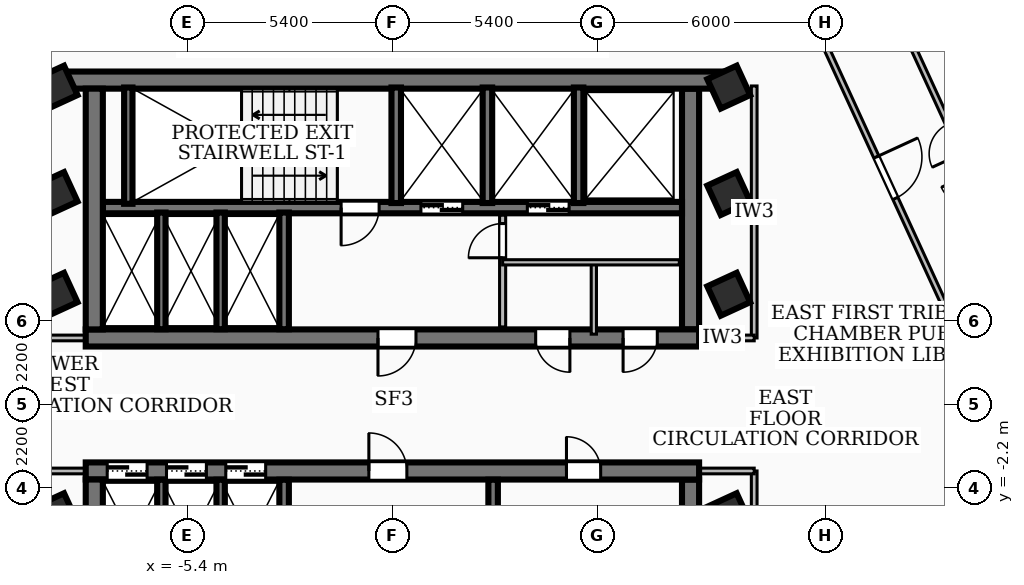
"""IFC4 building model, lengths in metres.
Left out: names, types, materials, properties, quantities, classifications, styles, units other than length and angle.
Written with IfcOpenShell. Run it as: python <this file> out.ifc"""

import sys

from ifc_helpers import new_model, si_unit, direction, frame, frame_2d, origin, origin_2d, place, context, subcontext, project, spatial, rectangle, extrude, element, fill, save


model = new_model("IFC4")
c1 = context("Model", 3, precision=1e-05, world=origin(), true_north=direction((0.0, 1.0)))
c2 = subcontext(c1, "Body", "Model", "MODEL_VIEW")
j1 = project(units=[si_unit("LENGTHUNIT", "METRE"), si_unit("PLANEANGLEUNIT", "RADIAN")], contexts=[c1])
p1 = place(None, origin())
s1 = spatial("IfcSite", under=j1, at=p1, CompositionType="ELEMENT")
p2 = place(p1, origin())
s2 = spatial("IfcBuilding", under=s1, at=p2, CompositionType="ELEMENT")
p3 = place(p2, frame((0.0, 0.0, 184.68)))
s3 = spatial("IfcBuildingStorey", under=s2, at=p3, CompositionType="ELEMENT", Elevation=184.68)
p4 = place(p3, frame((-8.78, 8.535, 0.0), z_axis=(0.0, 0.0, 1.0), x_axis=(1.0, 0.0, 0.0)))
e1 = element("IfcWall", 1, at=p4, inside=s3, PredefinedType="SHEAR", context=c2, shape_type="SweptSolid", body=[
    extrude(rectangle(XDim=17.56, YDim=0.45, at=frame_2d((8.78, 0.0))), origin(), (0.0, 0.0, 1.0), 3.34),
])
p5 = place(p3, frame((8.07, 1.75, 0.0), z_axis=(0.0, 0.0, 1.0), x_axis=(-1.0, 0.0, 0.0)))
e2 = element("IfcWall", 2, at=p5, inside=s3, PredefinedType="SHEAR", context=c2, shape_type="SweptSolid", body=[
    extrude(rectangle(XDim=16.14, YDim=0.45, at=frame_2d((8.07, 0.0))), origin(), (0.0, 0.0, 1.0), 3.34),
])
p6 = place(p5, frame((7.45, 0.0, 0.0)))
e3 = element("IfcOpeningElement", 3, at=p6, cuts=e2, PredefinedType="OPENING", context=c2, shape_type="SweptSolid", body=[
    extrude(rectangle(XDim=1.0, YDim=2.1, at=frame_2d((0.5, 1.05))), frame((0.0, 0.235, 0.0), z_axis=(0.0, -1.0, 0.0), x_axis=(1.0, 0.0, 0.0)), (0.0, 0.0, 1.0), 0.47),
])
p7 = place(p5, frame((3.4, 0.0, 0.0)))
e4 = element("IfcOpeningElement", 4, at=p7, cuts=e2, PredefinedType="OPENING", context=c2, shape_type="SweptSolid", body=[
    extrude(rectangle(XDim=0.9, YDim=2.06, at=frame_2d((0.45, 1.03))), frame((0.0, 0.235, 0.0), z_axis=(0.0, -1.0, 0.0), x_axis=(1.0, 0.0, 0.0)), (0.0, 0.0, 1.0), 0.47),
])
p8 = place(p5, frame((1.1, 0.0, 0.0)))
e5 = element("IfcOpeningElement", 5, at=p8, cuts=e2, PredefinedType="OPENING", context=c2, shape_type="SweptSolid", body=[
    extrude(rectangle(XDim=0.9, YDim=2.06, at=frame_2d((0.45, 1.03))), frame((0.0, 0.235, 0.0), z_axis=(0.0, -1.0, 0.0), x_axis=(1.0, 0.0, 0.0)), (0.0, 0.0, 1.0), 0.47),
])
for number, where, z_axis, x_axis in (
    (6, (-7.845, 1.975, 0.0), (0.0, 0.0, 1.0), (0.0, 1.0, 0.0)),
    (7, (7.845, 8.31, 0.0), (0.0, 0.0, 1.0), (0.0, -1.0, 0.0)),
):
    element("IfcWall", number, at=place(p3, frame(where, z_axis=z_axis, x_axis=x_axis)), inside=s3, PredefinedType="SHEAR", context=c2, shape_type="SweptSolid", body=[
        extrude(rectangle(XDim=6.335, YDim=0.45, at=frame_2d((3.167, 0.0))), origin(), (0.0, 0.0, 1.0), 3.34),
    ])
p9 = place(p3, frame((7.62, 5.18, 0.0), z_axis=(0.0, 0.0, 1.0), x_axis=(-1.0, 0.0, 0.0)))
e8 = element("IfcWall", 8, at=p9, inside=s3, PredefinedType="SOLIDWALL", context=c2, shape_type="SweptSolid", body=[
    extrude(rectangle(XDim=15.24, YDim=0.3, at=frame_2d((7.62, 0.0))), origin(), (0.0, 0.0, 1.0), 3.34),
])
p10 = place(p9, frame((5.77, 0.0, 0.0)))
e9 = element("IfcOpeningElement", 9, at=p10, cuts=e8, PredefinedType="OPENING", context=c2, shape_type="SweptSolid", body=[
    extrude(rectangle(XDim=1.1, YDim=2.15, at=frame_2d((0.55, 1.075))), frame((0.0, 0.16, 0.0), z_axis=(0.0, -1.0, 0.0), x_axis=(1.0, 0.0, 0.0)), (0.0, 0.0, 1.0), 0.32),
])
p11 = place(p9, frame((2.97, 0.0, 0.0)))
e10 = element("IfcOpeningElement", 10, at=p11, cuts=e8, PredefinedType="OPENING", context=c2, shape_type="SweptSolid", body=[
    extrude(rectangle(XDim=1.1, YDim=2.15, at=frame_2d((0.55, 1.075))), frame((0.0, 0.16, 0.0), z_axis=(0.0, -1.0, 0.0), x_axis=(1.0, 0.0, 0.0)), (0.0, 0.0, 1.0), 0.32),
])
p12 = place(p9, frame((7.97, 0.0, 0.0)))
e11 = element("IfcOpeningElement", 11, at=p12, cuts=e8, PredefinedType="OPENING", context=c2, shape_type="SweptSolid", body=[
    extrude(rectangle(XDim=1.0, YDim=2.1, at=frame_2d((0.5, 1.05))), frame((0.0, 0.16, 0.0), z_axis=(0.0, -1.0, 0.0), x_axis=(1.0, 0.0, 0.0)), (0.0, 0.0, 1.0), 0.32),
])
p13 = place(p3, frame((-8.07, -1.75, 0.0), z_axis=(0.0, 0.0, 1.0), x_axis=(1.0, 0.0, 0.0)))
e12 = element("IfcWall", 12, at=p13, inside=s3, PredefinedType="SHEAR", context=c2, shape_type="SweptSolid", body=[
    extrude(rectangle(XDim=16.14, YDim=0.45, at=frame_2d((8.07, 0.0))), origin(), (0.0, 0.0, 1.0), 3.34),
])
p14 = place(p13, frame((7.45, 0.0, 0.0)))
e13 = element("IfcOpeningElement", 13, at=p14, cuts=e12, PredefinedType="OPENING", context=c2, shape_type="SweptSolid", body=[
    extrude(rectangle(XDim=1.0, YDim=2.1, at=frame_2d((0.5, 1.05))), frame((0.0, 0.235, 0.0), z_axis=(0.0, -1.0, 0.0), x_axis=(1.0, 0.0, 0.0)), (0.0, 0.0, 1.0), 0.47),
])
p15 = place(p13, frame((12.65, 0.0, 0.0)))
e14 = element("IfcOpeningElement", 14, at=p15, cuts=e12, PredefinedType="OPENING", context=c2, shape_type="SweptSolid", body=[
    extrude(rectangle(XDim=0.9, YDim=2.06, at=frame_2d((0.45, 1.03))), frame((0.0, 0.235, 0.0), z_axis=(0.0, -1.0, 0.0), x_axis=(1.0, 0.0, 0.0)), (0.0, 0.0, 1.0), 0.47),
])
p16 = place(p13, frame((0.565, 0.0, 0.0)))
e15 = element("IfcOpeningElement", 15, at=p16, cuts=e12, PredefinedType="OPENING", context=c2, shape_type="SweptSolid", body=[
    extrude(rectangle(XDim=1.05, YDim=2.15, at=frame_2d((0.525, 1.075))), frame((0.0, 0.235, 0.0), z_axis=(0.0, -1.0, 0.0), x_axis=(1.0, 0.0, 0.0)), (0.0, 0.0, 1.0), 0.47),
])
p17 = place(p13, frame((2.125, 0.0, 0.0)))
e16 = element("IfcOpeningElement", 16, at=p17, cuts=e12, PredefinedType="OPENING", context=c2, shape_type="SweptSolid", body=[
    extrude(rectangle(XDim=1.05, YDim=2.15, at=frame_2d((0.525, 1.075))), frame((0.0, 0.235, 0.0), z_axis=(0.0, -1.0, 0.0), x_axis=(1.0, 0.0, 0.0)), (0.0, 0.0, 1.0), 0.47),
])
p18 = place(p13, frame((3.685, 0.0, 0.0)))
e17 = element("IfcOpeningElement", 17, at=p18, cuts=e12, PredefinedType="OPENING", context=c2, shape_type="SweptSolid", body=[
    extrude(rectangle(XDim=1.05, YDim=2.15, at=frame_2d((0.525, 1.075))), frame((0.0, 0.235, 0.0), z_axis=(0.0, -1.0, 0.0), x_axis=(1.0, 0.0, 0.0)), (0.0, 0.0, 1.0), 0.47),
])
for number, where, z_axis, x_axis in (
    (18, (-7.845, -8.31, 0.0), (0.0, 0.0, 1.0), (0.0, 1.0, 0.0)),
    (19, (7.845, -1.975, 0.0), (0.0, 0.0, 1.0), (0.0, -1.0, 0.0)),
):
    element("IfcWall", number, at=place(p3, frame(where, z_axis=z_axis, x_axis=x_axis)), inside=s3, PredefinedType="SHEAR", context=c2, shape_type="SweptSolid", body=[
        extrude(rectangle(XDim=6.335, YDim=0.45, at=frame_2d((3.167, 0.0))), origin(), (0.0, 0.0, 1.0), 3.34),
    ])
p19 = place(p3, frame((-6.95, 5.28, 0.0), z_axis=(0.0, 0.0, 1.0), x_axis=(0.0, 1.0, 0.0)))
e20 = element("IfcWall", 20, at=p19, inside=s3, PredefinedType="SOLIDWALL", context=c2, shape_type="SweptSolid", body=[
    extrude(rectangle(XDim=3.06, YDim=0.22, at=frame_2d((1.53, 0.0))), origin(), (0.0, 0.0, 1.0), 3.34),
])
for number, where, z_axis, x_axis in (
    (21, (0.1, 5.3, 0.0), (0.0, 0.0, 1.0), (0.0, 1.0, 0.0)),
    (22, (2.5, 5.3, 0.0), (0.0, 0.0, 1.0), (0.0, 1.0, 0.0)),
    (23, (4.9, 5.3, 0.0), (0.0, 0.0, 1.0), (0.0, 1.0, 0.0)),
):
    element("IfcWall", number, at=place(p3, frame(where, z_axis=z_axis, x_axis=x_axis)), inside=s3, PredefinedType="SOLIDWALL", context=c2, shape_type="SweptSolid", body=[
        extrude(rectangle(XDim=3.04, YDim=0.25, at=frame_2d((1.52, 0.0))), origin(), (0.0, 0.0, 1.0), 3.34),
    ])
for number, where, z_axis, x_axis in (
    (24, (-2.85, 1.98, 0.0), (0.0, 0.0, 1.0), (0.0, 1.0, 0.0)),
    (25, (-2.85, -5.05, 0.0), (0.0, 0.0, 1.0), (0.0, 1.0, 0.0)),
    (26, (2.65, -5.05, 0.0), (0.0, 0.0, 1.0), (0.0, 1.0, 0.0)),
):
    element("IfcWall", number, at=place(p3, frame(where, z_axis=z_axis, x_axis=x_axis)), inside=s3, PredefinedType="SOLIDWALL", context=c2, shape_type="SweptSolid", body=[
        extrude(rectangle(XDim=3.07, YDim=0.25, at=frame_2d((1.535, 0.0))), origin(), (0.0, 0.0, 1.0), 3.34),
    ])
for number, where, z_axis, x_axis in (
    (27, (-6.08, 1.98, 0.0), (0.0, 0.0, 1.0), (0.0, 1.0, 0.0)),
    (28, (-4.52, 1.98, 0.0), (0.0, 0.0, 1.0), (0.0, 1.0, 0.0)),
    (29, (-6.08, -5.05, 0.0), (0.0, 0.0, 1.0), (0.0, 1.0, 0.0)),
    (30, (-4.52, -5.05, 0.0), (0.0, 0.0, 1.0), (0.0, 1.0, 0.0)),
):
    element("IfcWall", number, at=place(p3, frame(where, z_axis=z_axis, x_axis=x_axis)), inside=s3, PredefinedType="SOLIDWALL", context=c2, shape_type="SweptSolid", body=[
        extrude(rectangle(XDim=3.07, YDim=0.22, at=frame_2d((1.535, 0.0))), origin(), (0.0, 0.0, 1.0), 3.34),
    ])
for number, where, z_axis, x_axis in (
    (31, (-8.85, -2.9, 0.0), (0.0, 0.0, 1.0), (0.909, 0.418, 0.0)),
    (32, (-8.85, 2.9, 0.0), (0.0, 0.0, 1.0), (0.909, 0.418, 0.0)),
    (33, (-8.85, 5.55, 0.0), (0.0, 0.0, 1.0), (0.909, 0.418, 0.0)),
    (34, (8.85, -2.9, 0.0), (0.0, 0.0, 1.0), (0.909, 0.418, 0.0)),
    (35, (8.85, 2.9, 0.0), (0.0, 0.0, 1.0), (0.909, 0.418, 0.0)),
    (36, (8.85, 5.55, 0.0), (0.0, 0.0, 1.0), (0.909, 0.418, 0.0)),
    (37, (-8.85, 8.35, 0.0), (0.0, 0.0, 1.0), (0.909, 0.418, 0.0)),
    (38, (8.85, 8.35, 0.0), (0.0, 0.0, 1.0), (0.909, 0.418, 0.0)),
):
    element("IfcColumn", number, at=place(p3, frame(where, z_axis=z_axis, x_axis=x_axis)), inside=s3, PredefinedType="COLUMN", context=c2, shape_type="SweptSolid", body=[
        extrude(rectangle(XDim=0.85, YDim=0.85, at=origin_2d()), origin(), (0.0, 0.0, 1.0), 3.6),
    ])
p20 = place(p3, frame((2.9, 2.04, 0.0), z_axis=(0.0, 0.0, 1.0), x_axis=(0.0, 1.0, 0.0)))
e39 = element("IfcWall", 39, at=p20, inside=s3, PredefinedType="PARTITIONING", context=c2, shape_type="SweptSolid", body=[
    extrude(rectangle(XDim=2.94, YDim=0.16, at=frame_2d((1.47, 0.0))), origin(), (0.0, 0.0, 1.0), 2.57),
])
p21 = place(p20, frame((1.82, 0.0, 0.0)))
e40 = element("IfcOpeningElement", 40, at=p21, cuts=e39, PredefinedType="OPENING", context=c2, shape_type="SweptSolid", body=[
    extrude(rectangle(XDim=0.9, YDim=2.06, at=frame_2d((0.45, 1.03))), frame((0.0, 0.09, 0.0), z_axis=(0.0, -1.0, 0.0), x_axis=(1.0, 0.0, 0.0)), (0.0, 0.0, 1.0), 0.18),
])
p22 = place(p3, frame((2.9, 3.74, 0.0), z_axis=(0.0, 0.0, 1.0), x_axis=(1.0, 0.0, 0.0)))
e41 = element("IfcWall", 41, at=p22, inside=s3, PredefinedType="PARTITIONING", context=c2, shape_type="SweptSolid", body=[
    extrude(rectangle(XDim=4.65, YDim=0.138, at=frame_2d((2.325, 0.0))), origin(), (0.0, 0.0, 1.0), 3.34),
])
p23 = place(p3, frame((5.3, 1.85, 0.0), z_axis=(0.0, 0.0, 1.0), x_axis=(0.0, 1.0, 0.0)))
e42 = element("IfcWall", 42, at=p23, inside=s3, PredefinedType="PARTITIONING", context=c2, shape_type="SweptSolid", body=[
    extrude(rectangle(XDim=1.89, YDim=0.138, at=frame_2d((0.945, 0.0))), origin(), (0.0, 0.0, 1.0), 2.57),
])
for number, where, z_axis, x_axis in (
    (43, (-7.85, 1.75, 0.0), (0.0, 0.0, 1.0), (-1.0, 0.0, 0.0)),
    (44, (-7.85, -1.75, 0.0), (0.0, 0.0, 1.0), (-1.0, 0.0, 0.0)),
):
    element("IfcWall", number, at=place(p3, frame(where, z_axis=z_axis, x_axis=x_axis)), inside=s3, PredefinedType="PARTITIONING", context=c2, shape_type="SweptSolid", body=[
        extrude(rectangle(XDim=1.67, YDim=0.15, at=frame_2d((0.835, 0.0))), origin(), (0.0, 0.0, 1.0), 2.57),
    ])
p24 = place(p3, frame((9.52, 1.75, 0.0), z_axis=(0.0, 0.0, 1.0), x_axis=(0.0, 1.0, 0.0)))
e45 = element("IfcWall", 45, at=p24, inside=s3, PredefinedType="PARTITIONING", context=c2, shape_type="SweptSolid", body=[
    extrude(rectangle(XDim=6.63, YDim=0.15, at=frame_2d((3.315, 0.0))), origin(), (0.0, 0.0, 1.0), 2.644),
])
p25 = place(p3, frame((7.85, 1.75, 0.0), z_axis=(0.0, 0.0, 1.0), x_axis=(1.0, 0.0, 0.0)))
e46 = element("IfcWall", 46, at=p25, inside=s3, PredefinedType="PARTITIONING", context=c2, shape_type="SweptSolid", body=[
    extrude(rectangle(XDim=1.67, YDim=0.15, at=frame_2d((0.835, 0.0))), origin(), (0.0, 0.0, 1.0), 2.57),
])
p26 = place(p3, frame((9.52, -8.38, 0.0), z_axis=(0.0, 0.0, 1.0), x_axis=(0.0, 1.0, 0.0)))
e47 = element("IfcWall", 47, at=p26, inside=s3, PredefinedType="PARTITIONING", context=c2, shape_type="SweptSolid", body=[
    extrude(rectangle(XDim=6.63, YDim=0.15, at=frame_2d((3.315, 0.0))), origin(), (0.0, 0.0, 1.0), 3.34),
])
p27 = place(p3, frame((7.85, -1.75, 0.0), z_axis=(0.0, 0.0, 1.0), x_axis=(1.0, 0.0, 0.0)))
e48 = element("IfcWall", 48, at=p27, inside=s3, PredefinedType="PARTITIONING", context=c2, shape_type="SweptSolid", body=[
    extrude(rectangle(XDim=1.67, YDim=0.15, at=frame_2d((0.835, 0.0))), origin(), (0.0, 0.0, 1.0), 2.57),
])
p28 = place(p3, frame((8.6, 15.508, 0.0), z_axis=(0.0, 0.0, 1.0), x_axis=(0.41757132443, -0.908644148726, 0.0)))
e49 = element("IfcWall", 49, at=p28, inside=s3, PredefinedType="PARTITIONING", context=c2, shape_type="SweptSolid", body=[
    extrude(rectangle(XDim=20.521, YDim=0.145, at=frame_2d((10.26, 0.0))), origin(), (0.0, 0.0, 1.0), 2.644),
])
p29 = place(p28, frame((9.9, 0.0, 0.0)))
e50 = element("IfcOpeningElement", 50, at=p29, cuts=e49, PredefinedType="OPENING", context=c2, shape_type="SweptSolid", body=[
    extrude(rectangle(XDim=1.2, YDim=2.1, at=frame_2d((0.6, 1.05))), frame((0.0, 0.083, 0.0), z_axis=(0.0, -1.0, 0.0), x_axis=(1.0, 0.0, 0.0)), (0.0, 0.0, 1.0), 0.165),
])
p30 = place(p3, frame((17.67, 0.752, 0.0), z_axis=(0.0, 0.0, 1.0), x_axis=(-0.41749974953, 0.908677037864, 0.0)))
e51 = element("IfcWall", 51, at=p30, inside=s3, PredefinedType="PARTITIONING", context=c2, shape_type="SweptSolid", body=[
    extrude(rectangle(XDim=12.91, YDim=0.145, at=frame_2d((6.455, 0.0))), origin(), (0.0, 0.0, 1.0), 2.644),
])
p31 = place(p30, frame((4.995, 0.0, 0.0)))
e52 = element("IfcOpeningElement", 52, at=p31, cuts=e51, PredefinedType="OPENING", context=c2, shape_type="SweptSolid", body=[
    extrude(rectangle(XDim=0.86, YDim=2.04, at=frame_2d((0.43, 1.02))), frame((0.0, 0.083, 0.0), z_axis=(0.0, -1.0, 0.0), x_axis=(1.0, 0.0, 0.0)), (0.0, 0.0, 1.0), 0.165),
])
p32 = place(p30, frame((6.435, 0.0, 0.0)))
e53 = element("IfcOpeningElement", 53, at=p32, cuts=e51, PredefinedType="OPENING", context=c2, shape_type="SweptSolid", body=[
    extrude(rectangle(XDim=0.86, YDim=2.04, at=frame_2d((0.43, 1.02))), frame((0.0, 0.083, 0.0), z_axis=(0.0, -1.0, 0.0), x_axis=(1.0, 0.0, 0.0)), (0.0, 0.0, 1.0), 0.165),
])
p33 = place(p3, frame((-15.508, 8.6, 0.0), z_axis=(0.0, 0.0, 1.0), x_axis=(0.908644148726, 0.41757132443, 0.0)))
e54 = element("IfcWall", 54, at=p33, inside=s3, PredefinedType="PARTITIONING", context=c2, shape_type="SweptSolid", body=[
    extrude(rectangle(XDim=20.521, YDim=0.145, at=frame_2d((10.26, 0.0))), origin(), (0.0, 0.0, 1.0), 2.644),
])
p34 = place(p33, frame((9.9, 0.0, 0.0)))
e55 = element("IfcOpeningElement", 55, at=p34, cuts=e54, PredefinedType="OPENING", context=c2, shape_type="SweptSolid", body=[
    extrude(rectangle(XDim=1.2, YDim=2.1, at=frame_2d((0.6, 1.05))), frame((0.0, 0.083, 0.0), z_axis=(0.0, -1.0, 0.0), x_axis=(1.0, 0.0, 0.0)), (0.0, 0.0, 1.0), 0.165),
])
p35 = place(p3, frame((-8.6, -15.508, 0.0), z_axis=(0.0, 0.0, 1.0), x_axis=(-0.41757132443, 0.908644148726, 0.0)))
e56 = element("IfcWall", 56, at=p35, inside=s3, PredefinedType="PARTITIONING", context=c2, shape_type="SweptSolid", body=[
    extrude(rectangle(XDim=20.521, YDim=0.145, at=frame_2d((10.26, 0.0))), origin(), (0.0, 0.0, 1.0), 2.644),
])
p36 = place(p35, frame((9.9, 0.0, 0.0)))
e57 = element("IfcOpeningElement", 57, at=p36, cuts=e56, PredefinedType="OPENING", context=c2, shape_type="SweptSolid", body=[
    extrude(rectangle(XDim=1.2, YDim=2.1, at=frame_2d((0.6, 1.05))), frame((0.0, 0.083, 0.0), z_axis=(0.0, -1.0, 0.0), x_axis=(1.0, 0.0, 0.0)), (0.0, 0.0, 1.0), 0.165),
])
p37 = place(p6, origin())
e58 = element("IfcDoor", 58, at=p37, inside=s3, OperationType="SINGLE_SWING_RIGHT", PredefinedType="DOOR", context=c2, shape_type="SweptSolid", body=[
    extrude(rectangle(XDim=1.0, YDim=2.1, at=frame_2d((0.5, 1.05))), frame((0.0, 0.025, 0.0), z_axis=(0.0, -1.0, 0.0), x_axis=(1.0, 0.0, 0.0)), (0.0, 0.0, 1.0), 0.05),
])
fill(e3, e58)
p38 = place(p14, origin())
e59 = element("IfcDoor", 59, at=p38, inside=s3, OperationType="SINGLE_SWING_LEFT", PredefinedType="DOOR", context=c2, shape_type="SweptSolid", body=[
    extrude(rectangle(XDim=1.0, YDim=2.1, at=frame_2d((0.5, 1.05))), frame((0.0, 0.025, 0.0), z_axis=(0.0, -1.0, 0.0), x_axis=(1.0, 0.0, 0.0)), (0.0, 0.0, 1.0), 0.05),
])
fill(e13, e59)
p39 = place(p10, origin())
e60 = element("IfcDoor", 60, at=p39, inside=s3, OperationType="DOUBLE_DOOR_SLIDING", PredefinedType="DOOR", context=c2, shape_type="SweptSolid", body=[
    extrude(rectangle(XDim=1.1, YDim=2.15, at=frame_2d((0.55, 1.075))), frame((0.0, 0.025, 0.0), z_axis=(0.0, -1.0, 0.0), x_axis=(1.0, 0.0, 0.0)), (0.0, 0.0, 1.0), 0.05),
])
fill(e9, e60)
p40 = place(p11, origin())
e61 = element("IfcDoor", 61, at=p40, inside=s3, OperationType="DOUBLE_DOOR_SLIDING", PredefinedType="DOOR", context=c2, shape_type="SweptSolid", body=[
    extrude(rectangle(XDim=1.1, YDim=2.15, at=frame_2d((0.55, 1.075))), frame((0.0, 0.025, 0.0), z_axis=(0.0, -1.0, 0.0), x_axis=(1.0, 0.0, 0.0)), (0.0, 0.0, 1.0), 0.05),
])
fill(e10, e61)
p41 = place(p12, origin())
e62 = element("IfcDoor", 62, at=p41, inside=s3, OperationType="SINGLE_SWING_RIGHT", PredefinedType="DOOR", context=c2, shape_type="SweptSolid", body=[
    extrude(rectangle(XDim=1.0, YDim=2.1, at=frame_2d((0.5, 1.05))), frame((0.0, 0.025, 0.0), z_axis=(0.0, -1.0, 0.0), x_axis=(1.0, 0.0, 0.0)), (0.0, 0.0, 1.0), 0.05),
])
fill(e11, e62)
p42 = place(p15, origin())
e63 = element("IfcDoor", 63, at=p42, inside=s3, OperationType="SINGLE_SWING_LEFT", PredefinedType="DOOR", context=c2, shape_type="SweptSolid", body=[
    extrude(rectangle(XDim=0.9, YDim=2.06, at=frame_2d((0.45, 1.03))), frame((0.0, 0.025, 0.0), z_axis=(0.0, -1.0, 0.0), x_axis=(1.0, 0.0, 0.0)), (0.0, 0.0, 1.0), 0.05),
])
fill(e14, e63)
p43 = place(p16, origin())
e64 = element("IfcDoor", 64, at=p43, inside=s3, OperationType="DOUBLE_DOOR_SLIDING", PredefinedType="DOOR", context=c2, shape_type="SweptSolid", body=[
    extrude(rectangle(XDim=1.05, YDim=2.15, at=frame_2d((0.525, 1.075))), frame((0.0, 0.025, 0.0), z_axis=(0.0, -1.0, 0.0), x_axis=(1.0, 0.0, 0.0)), (0.0, 0.0, 1.0), 0.05),
])
fill(e15, e64)
p44 = place(p17, origin())
e65 = element("IfcDoor", 65, at=p44, inside=s3, OperationType="DOUBLE_DOOR_SLIDING", PredefinedType="DOOR", context=c2, shape_type="SweptSolid", body=[
    extrude(rectangle(XDim=1.05, YDim=2.15, at=frame_2d((0.525, 1.075))), frame((0.0, 0.025, 0.0), z_axis=(0.0, -1.0, 0.0), x_axis=(1.0, 0.0, 0.0)), (0.0, 0.0, 1.0), 0.05),
])
fill(e16, e65)
p45 = place(p18, origin())
e66 = element("IfcDoor", 66, at=p45, inside=s3, OperationType="DOUBLE_DOOR_SLIDING", PredefinedType="DOOR", context=c2, shape_type="SweptSolid", body=[
    extrude(rectangle(XDim=1.05, YDim=2.15, at=frame_2d((0.525, 1.075))), frame((0.0, 0.025, 0.0), z_axis=(0.0, -1.0, 0.0), x_axis=(1.0, 0.0, 0.0)), (0.0, 0.0, 1.0), 0.05),
])
fill(e17, e66)
p46 = place(p7, origin())
e67 = element("IfcDoor", 67, at=p46, inside=s3, OperationType="SINGLE_SWING_LEFT", PredefinedType="DOOR", context=c2, shape_type="SweptSolid", body=[
    extrude(rectangle(XDim=0.9, YDim=2.06, at=frame_2d((0.45, 1.03))), frame((0.0, 0.025, 0.0), z_axis=(0.0, -1.0, 0.0), x_axis=(1.0, 0.0, 0.0)), (0.0, 0.0, 1.0), 0.05),
])
fill(e4, e67)
p47 = place(p8, origin())
e68 = element("IfcDoor", 68, at=p47, inside=s3, OperationType="SINGLE_SWING_RIGHT", PredefinedType="DOOR", context=c2, shape_type="SweptSolid", body=[
    extrude(rectangle(XDim=0.9, YDim=2.06, at=frame_2d((0.45, 1.03))), frame((0.0, 0.025, 0.0), z_axis=(0.0, -1.0, 0.0), x_axis=(1.0, 0.0, 0.0)), (0.0, 0.0, 1.0), 0.05),
])
fill(e5, e68)
p48 = place(p21, origin())
e69 = element("IfcDoor", 69, at=p48, inside=s3, OperationType="SINGLE_SWING_LEFT", PredefinedType="DOOR", context=c2, shape_type="SweptSolid", body=[
    extrude(rectangle(XDim=0.9, YDim=2.06, at=frame_2d((0.45, 1.03))), frame((0.0, 0.025, 0.0), z_axis=(0.0, -1.0, 0.0), x_axis=(1.0, 0.0, 0.0)), (0.0, 0.0, 1.0), 0.05),
])
fill(e40, e69)
p49 = place(p29, origin())
e70 = element("IfcDoor", 70, at=p49, inside=s3, OperationType="SINGLE_SWING_LEFT", PredefinedType="DOOR", context=c2, shape_type="SweptSolid", body=[
    extrude(rectangle(XDim=1.2, YDim=2.1, at=frame_2d((0.6, 1.05))), frame((0.0, 0.025, 0.0), z_axis=(0.0, -1.0, 0.0), x_axis=(1.0, 0.0, 0.0)), (0.0, 0.0, 1.0), 0.05),
])
fill(e50, e70)
save(model, sys.argv[1])
